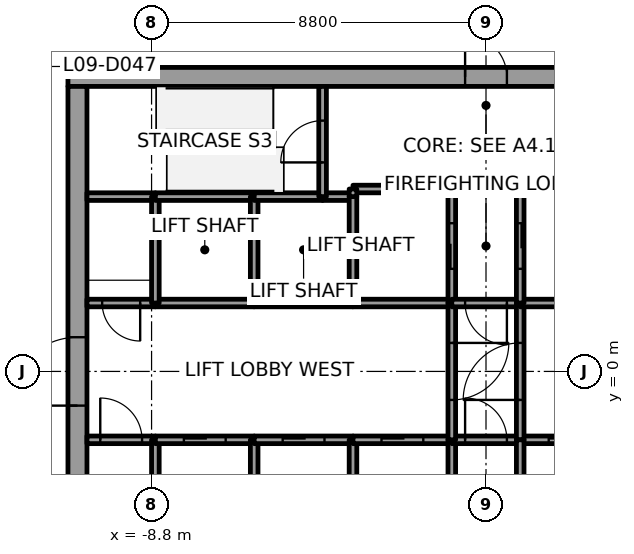
"""IFC4 building model, lengths in metres.
Left out: names, types, materials, properties, quantities, classifications, styles, units other than length and angle.
Written with IfcOpenShell. Run it as: python <this file> out.ifc"""

import sys

from ifc_helpers import new_model, si_unit, direction, frame, frame_2d, origin, place, context, subcontext, project, spatial, rectangle, extrude, element, fill, save


model = new_model("IFC4")
c1 = context("Model", 3, precision=1e-05, world=origin(), true_north=direction((0.0, 1.0)))
c2 = subcontext(c1, "Body", "Model", "MODEL_VIEW")
j1 = project(units=[si_unit("LENGTHUNIT", "METRE"), si_unit("PLANEANGLEUNIT", "RADIAN")], contexts=[c1])
p1 = place(None, origin())
s1 = spatial("IfcSite", under=j1, at=p1, CompositionType="ELEMENT")
p2 = place(p1, origin())
s2 = spatial("IfcBuilding", under=s1, at=p2, CompositionType="ELEMENT")
p3 = place(p2, frame((0.0, 0.0, 55.4)))
s3 = spatial("IfcBuildingStorey", under=s2, at=p3, CompositionType="ELEMENT", Elevation=55.4)
p4 = place(p3, frame((-11.0, 7.75, 0.0), z_axis=(0.0, 0.0, 1.0), x_axis=(1.0, 0.0, 0.0)))
e1 = element("IfcWall", 1, at=p4, inside=s3, PredefinedType="SHEAR", context=c2, shape_type="SweptSolid", body=[
    extrude(rectangle(XDim=22.0, YDim=0.5, at=frame_2d((11.0, 0.0))), origin(), (0.0, 0.0, 1.0), 3.7),
])
p5 = place(p4, frame((10.45, 0.0, 0.0)))
e2 = element("IfcOpeningElement", 2, at=p5, cuts=e1, PredefinedType="OPENING", context=c2, shape_type="SweptSolid", body=[
    extrude(rectangle(XDim=1.1, YDim=2.1, at=frame_2d((0.55, 1.05))), frame((0.0, 0.25, 0.0), z_axis=(0.0, -1.0, 0.0), x_axis=(1.0, 0.0, 0.0)), (0.0, 0.0, 1.0), 0.5),
])
p6 = place(p3, frame((-10.75, -7.5, 0.0), z_axis=(0.0, 0.0, 1.0), x_axis=(0.0, 1.0, 0.0)))
e3 = element("IfcWall", 3, at=p6, inside=s3, PredefinedType="SHEAR", context=c2, shape_type="SweptSolid", body=[
    extrude(rectangle(XDim=15.0, YDim=0.5, at=frame_2d((7.5, 0.0))), origin(), (0.0, 0.0, 1.0), 3.7),
])
p7 = place(p6, frame((6.6, 0.0, 0.0)))
e4 = element("IfcOpeningElement", 4, at=p7, cuts=e3, PredefinedType="OPENING", context=c2, shape_type="SweptSolid", body=[
    extrude(rectangle(XDim=1.8, YDim=2.1, at=frame_2d((0.9, 1.05))), frame((0.0, 0.25, 0.0), z_axis=(0.0, -1.0, 0.0), x_axis=(1.0, 0.0, 0.0)), (0.0, 0.0, 1.0), 0.5),
])
p8 = place(p3, frame((-10.5, -1.8, 0.0), z_axis=(0.0, 0.0, 1.0), x_axis=(1.0, 0.0, 0.0)))
e5 = element("IfcWall", 5, at=p8, inside=s3, PredefinedType="SOLIDWALL", context=c2, shape_type="SweptSolid", body=[
    extrude(rectangle(XDim=1.8, YDim=0.2, at=frame_2d((0.9, 0.0))), origin(), (0.0, 0.0, 1.0), 3.55),
])
p9 = place(p8, frame((0.35, 0.0, 0.0)))
e6 = element("IfcOpeningElement", 6, at=p9, cuts=e5, PredefinedType="OPENING", context=c2, shape_type="SweptSolid", body=[
    extrude(rectangle(XDim=1.1, YDim=2.1, at=frame_2d((0.55, 1.05))), frame((0.0, 0.1, 0.0), z_axis=(0.0, -1.0, 0.0), x_axis=(1.0, 0.0, 0.0)), (0.0, 0.0, 1.0), 0.2),
])
p10 = place(p3, frame((-8.7, 1.8, 0.0), z_axis=(0.0, 0.0, 1.0), x_axis=(-1.0, 0.0, 0.0)))
e7 = element("IfcWall", 7, at=p10, inside=s3, PredefinedType="SOLIDWALL", context=c2, shape_type="SweptSolid", body=[
    extrude(rectangle(XDim=1.8, YDim=0.2, at=frame_2d((0.9, 0.0))), origin(), (0.0, 0.0, 1.0), 3.55),
])
p11 = place(p10, frame((0.4, 0.0, 0.0)))
e8 = element("IfcOpeningElement", 8, at=p11, cuts=e7, PredefinedType="OPENING", context=c2, shape_type="SweptSolid", body=[
    extrude(rectangle(XDim=1.0, YDim=2.1, at=frame_2d((0.5, 1.05))), frame((0.0, 0.1, 0.0), z_axis=(0.0, -1.0, 0.0), x_axis=(1.0, 0.0, 0.0)), (0.0, 0.0, 1.0), 0.2),
])
p12 = place(p3, frame((-8.7, 4.6, 0.0), z_axis=(0.0, 0.0, 1.0), x_axis=(-1.0, 0.0, 0.0)))
e9 = element("IfcWall", 9, at=p12, inside=s3, PredefinedType="SOLIDWALL", context=c2, shape_type="SweptSolid", body=[
    extrude(rectangle(XDim=1.8, YDim=0.2, at=frame_2d((0.9, 0.0))), origin(), (0.0, 0.0, 1.0), 3.55),
])
p13 = place(p3, frame((-8.7, -4.6, 0.0), z_axis=(0.0, 0.0, 1.0), x_axis=(0.0, 1.0, 0.0)))
e10 = element("IfcWall", 10, at=p13, inside=s3, PredefinedType="SOLIDWALL", context=c2, shape_type="SweptSolid", body=[
    extrude(rectangle(XDim=2.8, YDim=0.2, at=frame_2d((1.4, 0.0))), origin(), (0.0, 0.0, 1.0), 3.55),
])
p14 = place(p3, frame((-8.7, -1.8, 0.0), z_axis=(0.0, 0.0, 1.0), x_axis=(1.0, 0.0, 0.0)))
e11 = element("IfcWall", 11, at=p14, inside=s3, PredefinedType="SOLIDWALL", context=c2, shape_type="SweptSolid", body=[
    extrude(rectangle(XDim=2.6, YDim=0.2, at=frame_2d((1.3, 0.0))), origin(), (0.0, 0.0, 1.0), 3.55),
])
p15 = place(p14, frame((0.75, 0.0, 0.0)))
e12 = element("IfcOpeningElement", 12, at=p15, cuts=e11, PredefinedType="OPENING", context=c2, shape_type="SweptSolid", body=[
    extrude(rectangle(XDim=1.1, YDim=2.1, at=frame_2d((0.55, 1.05))), frame((0.0, 0.1, 0.0), z_axis=(0.0, -1.0, 0.0), x_axis=(1.0, 0.0, 0.0)), (0.0, 0.0, 1.0), 0.2),
])
p16 = place(p3, frame((-6.1, 1.8, 0.0), z_axis=(0.0, 0.0, 1.0), x_axis=(-1.0, 0.0, 0.0)))
e13 = element("IfcWall", 13, at=p16, inside=s3, PredefinedType="SOLIDWALL", context=c2, shape_type="SweptSolid", body=[
    extrude(rectangle(XDim=2.6, YDim=0.2, at=frame_2d((1.3, 0.0))), origin(), (0.0, 0.0, 1.0), 3.55),
])
p17 = place(p3, frame((-8.7, 1.8, 0.0), z_axis=(0.0, 0.0, 1.0), x_axis=(0.0, 1.0, 0.0)))
e14 = element("IfcWall", 14, at=p17, inside=s3, PredefinedType="SOLIDWALL", context=c2, shape_type="SweptSolid", body=[
    extrude(rectangle(XDim=2.8, YDim=0.2, at=frame_2d((1.4, 0.0))), origin(), (0.0, 0.0, 1.0), 3.55),
])
p18 = place(p3, frame((-6.1, 4.6, 0.0), z_axis=(0.0, 0.0, 1.0), x_axis=(-1.0, 0.0, 0.0)))
e15 = element("IfcWall", 15, at=p18, inside=s3, PredefinedType="SOLIDWALL", context=c2, shape_type="SweptSolid", body=[
    extrude(rectangle(XDim=2.6, YDim=0.2, at=frame_2d((1.3, 0.0))), origin(), (0.0, 0.0, 1.0), 3.55),
])
p19 = place(p3, frame((-6.1, -4.6, 0.0), z_axis=(0.0, 0.0, 1.0), x_axis=(0.0, 1.0, 0.0)))
e16 = element("IfcWall", 16, at=p19, inside=s3, PredefinedType="SOLIDWALL", context=c2, shape_type="SweptSolid", body=[
    extrude(rectangle(XDim=2.8, YDim=0.2, at=frame_2d((1.4, 0.0))), origin(), (0.0, 0.0, 1.0), 3.55),
])
p20 = place(p3, frame((-6.1, -1.8, 0.0), z_axis=(0.0, 0.0, 1.0), x_axis=(1.0, 0.0, 0.0)))
e17 = element("IfcWall", 17, at=p20, inside=s3, PredefinedType="SOLIDWALL", context=c2, shape_type="SweptSolid", body=[
    extrude(rectangle(XDim=2.6, YDim=0.2, at=frame_2d((1.3, 0.0))), origin(), (0.0, 0.0, 1.0), 3.55),
])
p21 = place(p20, frame((0.75, 0.0, 0.0)))
e18 = element("IfcOpeningElement", 18, at=p21, cuts=e17, PredefinedType="OPENING", context=c2, shape_type="SweptSolid", body=[
    extrude(rectangle(XDim=1.1, YDim=2.1, at=frame_2d((0.55, 1.05))), frame((0.0, 0.1, 0.0), z_axis=(0.0, -1.0, 0.0), x_axis=(1.0, 0.0, 0.0)), (0.0, 0.0, 1.0), 0.2),
])
p22 = place(p3, frame((-3.5, 1.8, 0.0), z_axis=(0.0, 0.0, 1.0), x_axis=(-1.0, 0.0, 0.0)))
e19 = element("IfcWall", 19, at=p22, inside=s3, PredefinedType="SOLIDWALL", context=c2, shape_type="SweptSolid", body=[
    extrude(rectangle(XDim=2.6, YDim=0.2, at=frame_2d((1.3, 0.0))), origin(), (0.0, 0.0, 1.0), 3.55),
])
p23 = place(p3, frame((-6.1, 1.8, 0.0), z_axis=(0.0, 0.0, 1.0), x_axis=(0.0, 1.0, 0.0)))
e20 = element("IfcWall", 20, at=p23, inside=s3, PredefinedType="SOLIDWALL", context=c2, shape_type="SweptSolid", body=[
    extrude(rectangle(XDim=2.8, YDim=0.2, at=frame_2d((1.4, 0.0))), origin(), (0.0, 0.0, 1.0), 3.55),
])
p24 = place(p3, frame((-4.3, 4.6, 0.0), z_axis=(0.0, 0.0, 1.0), x_axis=(-1.0, 0.0, 0.0)))
e21 = element("IfcWall", 21, at=p24, inside=s3, PredefinedType="SOLIDWALL", context=c2, shape_type="SweptSolid", body=[
    extrude(rectangle(XDim=1.8, YDim=0.2, at=frame_2d((0.9, 0.0))), origin(), (0.0, 0.0, 1.0), 3.55),
])
p25 = place(p3, frame((-3.5, 4.6, 0.0), z_axis=(0.0, 0.0, 1.0), x_axis=(-1.0, 0.0, 0.0)))
e22 = element("IfcWall", 22, at=p25, inside=s3, PredefinedType="SOLIDWALL", context=c2, shape_type="SweptSolid", body=[
    extrude(rectangle(XDim=0.8, YDim=0.2, at=frame_2d((0.4, 0.0))), origin(), (0.0, 0.0, 1.0), 3.55),
])
p26 = place(p3, frame((-4.3, 4.6, 0.0), z_axis=(0.0, 0.0, 1.0), x_axis=(0.0, 1.0, 0.0)))
e23 = element("IfcWall", 23, at=p26, inside=s3, PredefinedType="SOLIDWALL", context=c2, shape_type="SweptSolid", body=[
    extrude(rectangle(XDim=2.9, YDim=0.2, at=frame_2d((1.45, 0.0))), origin(), (0.0, 0.0, 1.0), 3.55),
])
p27 = place(p26, frame((0.9, 0.0, 0.0)))
e24 = element("IfcOpeningElement", 24, at=p27, cuts=e23, PredefinedType="OPENING", context=c2, shape_type="SweptSolid", body=[
    extrude(rectangle(XDim=1.1, YDim=2.1, at=frame_2d((0.55, 1.05))), frame((0.0, 0.1, 0.0), z_axis=(0.0, -1.0, 0.0), x_axis=(1.0, 0.0, 0.0)), (0.0, 0.0, 1.0), 0.2),
])
p28 = place(p3, frame((-3.5, -4.6, 0.0), z_axis=(0.0, 0.0, 1.0), x_axis=(0.0, 1.0, 0.0)))
e25 = element("IfcWall", 25, at=p28, inside=s3, PredefinedType="SOLIDWALL", context=c2, shape_type="SweptSolid", body=[
    extrude(rectangle(XDim=2.8, YDim=0.2, at=frame_2d((1.4, 0.0))), origin(), (0.0, 0.0, 1.0), 3.55),
])
p29 = place(p3, frame((-3.5, -1.8, 0.0), z_axis=(0.0, 0.0, 1.0), x_axis=(1.0, 0.0, 0.0)))
e26 = element("IfcWall", 26, at=p29, inside=s3, PredefinedType="SOLIDWALL", context=c2, shape_type="SweptSolid", body=[
    extrude(rectangle(XDim=2.6, YDim=0.2, at=frame_2d((1.3, 0.0))), origin(), (0.0, 0.0, 1.0), 3.55),
])
p30 = place(p29, frame((0.75, 0.0, 0.0)))
e27 = element("IfcOpeningElement", 27, at=p30, cuts=e26, PredefinedType="OPENING", context=c2, shape_type="SweptSolid", body=[
    extrude(rectangle(XDim=1.1, YDim=2.1, at=frame_2d((0.55, 1.05))), frame((0.0, 0.1, 0.0), z_axis=(0.0, -1.0, 0.0), x_axis=(1.0, 0.0, 0.0)), (0.0, 0.0, 1.0), 0.2),
])
p31 = place(p3, frame((-0.9, 1.8, 0.0), z_axis=(0.0, 0.0, 1.0), x_axis=(-1.0, 0.0, 0.0)))
e28 = element("IfcWall", 28, at=p31, inside=s3, PredefinedType="SOLIDWALL", context=c2, shape_type="SweptSolid", body=[
    extrude(rectangle(XDim=2.6, YDim=0.2, at=frame_2d((1.3, 0.0))), origin(), (0.0, 0.0, 1.0), 3.55),
])
p32 = place(p3, frame((-3.5, 4.6, 0.0), z_axis=(0.0, 0.0, 1.0), x_axis=(0.0, -1.0, 0.0)))
e29 = element("IfcWall", 29, at=p32, inside=s3, PredefinedType="SOLIDWALL", context=c2, shape_type="SweptSolid", body=[
    extrude(rectangle(XDim=2.8, YDim=0.2, at=frame_2d((1.4, 0.0))), origin(), (0.0, 0.0, 1.0), 3.55),
])
p33 = place(p3, frame((-0.9, 1.8, 0.0), z_axis=(0.0, 0.0, 1.0), x_axis=(0.0, 1.0, 0.0)))
e30 = element("IfcWall", 30, at=p33, inside=s3, PredefinedType="SOLIDWALL", context=c2, shape_type="SweptSolid", body=[
    extrude(rectangle(XDim=3.0, YDim=0.2, at=frame_2d((1.5, 0.0))), origin(), (0.0, 0.0, 1.0), 3.55),
])
p34 = place(p33, frame((0.9, 0.0, 0.0)))
e31 = element("IfcOpeningElement", 31, at=p34, cuts=e30, PredefinedType="OPENING", context=c2, shape_type="SweptSolid", body=[
    extrude(rectangle(XDim=1.2, YDim=2.1, at=frame_2d((0.6, 1.05))), frame((0.0, 0.1, 0.0), z_axis=(0.0, -1.0, 0.0), x_axis=(1.0, 0.0, 0.0)), (0.0, 0.0, 1.0), 0.2),
])
p35 = place(p3, frame((-0.9, 4.8, 0.0), z_axis=(0.0, 0.0, 1.0), x_axis=(-1.0, 0.0, 0.0)))
e32 = element("IfcWall", 32, at=p35, inside=s3, PredefinedType="SOLIDWALL", context=c2, shape_type="SweptSolid", body=[
    extrude(rectangle(XDim=2.6, YDim=0.2, at=frame_2d((1.3, 0.0))), origin(), (0.0, 0.0, 1.0), 3.55),
])
p36 = place(p3, frame((-3.5, 4.8, 0.0), z_axis=(0.0, 0.0, 1.0), x_axis=(0.0, -1.0, 0.0)))
e33 = element("IfcWall", 33, at=p36, inside=s3, PredefinedType="SOLIDWALL", context=c2, shape_type="SweptSolid", body=[
    extrude(rectangle(XDim=0.2, YDim=0.2, at=frame_2d((0.1, 0.0))), origin(), (0.0, 0.0, 1.0), 3.55),
])
p37 = place(p3, frame((-0.9, -4.6, 0.0), z_axis=(0.0, 0.0, 1.0), x_axis=(0.0, 1.0, 0.0)))
e34 = element("IfcWall", 34, at=p37, inside=s3, PredefinedType="SOLIDWALL", context=c2, shape_type="SweptSolid", body=[
    extrude(rectangle(XDim=2.8, YDim=0.2, at=frame_2d((1.4, 0.0))), origin(), (0.0, 0.0, 1.0), 3.55),
])
p38 = place(p3, frame((-0.9, -1.8, 0.0), z_axis=(0.0, 0.0, 1.0), x_axis=(1.0, 0.0, 0.0)))
e35 = element("IfcWall", 35, at=p38, inside=s3, PredefinedType="SOLIDWALL", context=c2, shape_type="SweptSolid", body=[
    extrude(rectangle(XDim=1.8, YDim=0.2, at=frame_2d((0.9, 0.0))), origin(), (0.0, 0.0, 1.0), 3.55),
])
p39 = place(p38, frame((0.35, 0.0, 0.0)))
e36 = element("IfcOpeningElement", 36, at=p39, cuts=e35, PredefinedType="OPENING", context=c2, shape_type="SweptSolid", body=[
    extrude(rectangle(XDim=1.1, YDim=2.1, at=frame_2d((0.55, 1.05))), frame((0.0, 0.1, 0.0), z_axis=(0.0, -1.0, 0.0), x_axis=(1.0, 0.0, 0.0)), (0.0, 0.0, 1.0), 0.2),
])
p40 = place(p3, frame((-0.9, 1.8, 0.0), z_axis=(0.0, 0.0, 1.0), x_axis=(0.0, -1.0, 0.0)))
e37 = element("IfcWall", 37, at=p40, inside=s3, PredefinedType="SOLIDWALL", context=c2, shape_type="SweptSolid", body=[
    extrude(rectangle(XDim=3.6, YDim=0.2, at=frame_2d((1.8, 0.0))), origin(), (0.0, 0.0, 1.0), 3.55),
])
p41 = place(p40, frame((1.05, 0.0, 0.0)))
e38 = element("IfcOpeningElement", 38, at=p41, cuts=e37, PredefinedType="OPENING", context=c2, shape_type="SweptSolid", body=[
    extrude(rectangle(XDim=1.5, YDim=2.1, at=frame_2d((0.75, 1.05))), frame((0.0, 0.1, 0.0), z_axis=(0.0, -1.0, 0.0), x_axis=(1.0, 0.0, 0.0)), (0.0, 0.0, 1.0), 0.2),
])
p42 = place(p3, frame((0.9, 1.8, 0.0), z_axis=(0.0, 0.0, 1.0), x_axis=(-1.0, 0.0, 0.0)))
e39 = element("IfcWall", 39, at=p42, inside=s3, PredefinedType="SOLIDWALL", context=c2, shape_type="SweptSolid", body=[
    extrude(rectangle(XDim=1.8, YDim=0.2, at=frame_2d((0.9, 0.0))), origin(), (0.0, 0.0, 1.0), 3.55),
])
p43 = place(p42, frame((0.35, 0.0, 0.0)))
e40 = element("IfcOpeningElement", 40, at=p43, cuts=e39, PredefinedType="OPENING", context=c2, shape_type="SweptSolid", body=[
    extrude(rectangle(XDim=1.1, YDim=2.1, at=frame_2d((0.55, 1.05))), frame((0.0, 0.1, 0.0), z_axis=(0.0, -1.0, 0.0), x_axis=(1.0, 0.0, 0.0)), (0.0, 0.0, 1.0), 0.2),
])
p44 = place(p3, frame((0.9, -1.8, 0.0), z_axis=(0.0, 0.0, 1.0), x_axis=(1.0, 0.0, 0.0)))
e41 = element("IfcWall", 41, at=p44, inside=s3, PredefinedType="SOLIDWALL", context=c2, shape_type="SweptSolid", body=[
    extrude(rectangle(XDim=2.6, YDim=0.2, at=frame_2d((1.3, 0.0))), origin(), (0.0, 0.0, 1.0), 3.55),
])
p45 = place(p44, frame((0.75, 0.0, 0.0)))
e42 = element("IfcOpeningElement", 42, at=p45, cuts=e41, PredefinedType="OPENING", context=c2, shape_type="SweptSolid", body=[
    extrude(rectangle(XDim=1.1, YDim=2.1, at=frame_2d((0.55, 1.05))), frame((0.0, 0.1, 0.0), z_axis=(0.0, -1.0, 0.0), x_axis=(1.0, 0.0, 0.0)), (0.0, 0.0, 1.0), 0.2),
])
p46 = place(p3, frame((0.9, -1.8, 0.0), z_axis=(0.0, 0.0, 1.0), x_axis=(0.0, 1.0, 0.0)))
e43 = element("IfcWall", 43, at=p46, inside=s3, PredefinedType="SOLIDWALL", context=c2, shape_type="SweptSolid", body=[
    extrude(rectangle(XDim=3.6, YDim=0.2, at=frame_2d((1.8, 0.0))), origin(), (0.0, 0.0, 1.0), 3.55),
])
p47 = place(p46, frame((1.05, 0.0, 0.0)))
e44 = element("IfcOpeningElement", 44, at=p47, cuts=e43, PredefinedType="OPENING", context=c2, shape_type="SweptSolid", body=[
    extrude(rectangle(XDim=1.5, YDim=2.1, at=frame_2d((0.75, 1.05))), frame((0.0, 0.1, 0.0), z_axis=(0.0, -1.0, 0.0), x_axis=(1.0, 0.0, 0.0)), (0.0, 0.0, 1.0), 0.2),
])
p48 = place(p3, frame((0.9, -1.8, 0.0), z_axis=(0.0, 0.0, 1.0), x_axis=(0.0, -1.0, 0.0)))
e45 = element("IfcWall", 45, at=p48, inside=s3, PredefinedType="SOLIDWALL", context=c2, shape_type="SweptSolid", body=[
    extrude(rectangle(XDim=2.8, YDim=0.2, at=frame_2d((1.4, 0.0))), origin(), (0.0, 0.0, 1.0), 3.55),
])
for number, where, z_axis, x_axis in (
    (46, (3.5, 1.8, 0.0), (0.0, 0.0, 1.0), (-1.0, 0.0, 0.0)),
    (47, (3.5, 4.8, 0.0), (0.0, 0.0, 1.0), (-1.0, 0.0, 0.0)),
):
    element("IfcWall", number, at=place(p3, frame(where, z_axis=z_axis, x_axis=x_axis)), inside=s3, PredefinedType="SOLIDWALL", context=c2, shape_type="SweptSolid", body=[
        extrude(rectangle(XDim=2.6, YDim=0.2, at=frame_2d((1.3, 0.0))), origin(), (0.0, 0.0, 1.0), 3.55),
    ])
p49 = place(p3, frame((0.9, 4.8, 0.0), z_axis=(0.0, 0.0, 1.0), x_axis=(0.0, -1.0, 0.0)))
e48 = element("IfcWall", 48, at=p49, inside=s3, PredefinedType="SOLIDWALL", context=c2, shape_type="SweptSolid", body=[
    extrude(rectangle(XDim=3.0, YDim=0.2, at=frame_2d((1.5, 0.0))), origin(), (0.0, 0.0, 1.0), 3.55),
])
p50 = place(p49, frame((0.9, 0.0, 0.0)))
e49 = element("IfcOpeningElement", 49, at=p50, cuts=e48, PredefinedType="OPENING", context=c2, shape_type="SweptSolid", body=[
    extrude(rectangle(XDim=1.2, YDim=2.1, at=frame_2d((0.6, 1.05))), frame((0.0, 0.1, 0.0), z_axis=(0.0, -1.0, 0.0), x_axis=(1.0, 0.0, 0.0)), (0.0, 0.0, 1.0), 0.2),
])
p51 = place(p15, origin())
e50 = element("IfcDoor", 50, at=p51, inside=s3, OperationType="SLIDING_TO_LEFT", PredefinedType="DOOR", context=c2, shape_type="SweptSolid", body=[
    extrude(rectangle(XDim=1.1, YDim=2.1, at=frame_2d((0.55, 1.05))), frame((0.0, 0.025, 0.0), z_axis=(0.0, -1.0, 0.0), x_axis=(1.0, 0.0, 0.0)), (0.0, 0.0, 1.0), 0.05),
])
fill(e12, e50)
p52 = place(p21, origin())
e51 = element("IfcDoor", 51, at=p52, inside=s3, OperationType="SLIDING_TO_RIGHT", PredefinedType="DOOR", context=c2, shape_type="SweptSolid", body=[
    extrude(rectangle(XDim=1.1, YDim=2.1, at=frame_2d((0.55, 1.05))), frame((0.0, 0.025, 0.0), z_axis=(0.0, -1.0, 0.0), x_axis=(1.0, 0.0, 0.0)), (0.0, 0.0, 1.0), 0.05),
])
fill(e18, e51)
p53 = place(p30, origin())
e52 = element("IfcDoor", 52, at=p53, inside=s3, OperationType="SLIDING_TO_RIGHT", PredefinedType="DOOR", context=c2, shape_type="SweptSolid", body=[
    extrude(rectangle(XDim=1.1, YDim=2.1, at=frame_2d((0.55, 1.05))), frame((0.0, 0.025, 0.0), z_axis=(0.0, -1.0, 0.0), x_axis=(1.0, 0.0, 0.0)), (0.0, 0.0, 1.0), 0.05),
])
fill(e27, e52)
p54 = place(p45, origin())
e53 = element("IfcDoor", 53, at=p54, inside=s3, OperationType="SLIDING_TO_RIGHT", PredefinedType="DOOR", context=c2, shape_type="SweptSolid", body=[
    extrude(rectangle(XDim=1.1, YDim=2.1, at=frame_2d((0.55, 1.05))), frame((0.0, 0.025, 0.0), z_axis=(0.0, -1.0, 0.0), x_axis=(1.0, 0.0, 0.0)), (0.0, 0.0, 1.0), 0.05),
])
fill(e42, e53)
p55 = place(p34, origin())
e54 = element("IfcDoor", 54, at=p55, inside=s3, OperationType="SLIDING_TO_RIGHT", PredefinedType="DOOR", context=c2, shape_type="SweptSolid", body=[
    extrude(rectangle(XDim=1.2, YDim=2.1, at=frame_2d((0.6, 1.05))), frame((0.0, 0.025, 0.0), z_axis=(0.0, -1.0, 0.0), x_axis=(1.0, 0.0, 0.0)), (0.0, 0.0, 1.0), 0.05),
])
fill(e31, e54)
p56 = place(p50, origin())
e55 = element("IfcDoor", 55, at=p56, inside=s3, OperationType="SLIDING_TO_RIGHT", PredefinedType="DOOR", context=c2, shape_type="SweptSolid", body=[
    extrude(rectangle(XDim=1.2, YDim=2.1, at=frame_2d((0.6, 1.05))), frame((0.0, 0.025, 0.0), z_axis=(0.0, -1.0, 0.0), x_axis=(1.0, 0.0, 0.0)), (0.0, 0.0, 1.0), 0.05),
])
fill(e49, e55)
p57 = place(p41, origin())
e56 = element("IfcDoor", 56, at=p57, inside=s3, OperationType="DOUBLE_DOOR_SINGLE_SWING", PredefinedType="DOOR", context=c2, shape_type="SweptSolid", body=[
    extrude(rectangle(XDim=1.5, YDim=2.1, at=frame_2d((0.75, 1.05))), frame((0.0, 0.025, 0.0), z_axis=(0.0, -1.0, 0.0), x_axis=(1.0, 0.0, 0.0)), (0.0, 0.0, 1.0), 0.05),
])
fill(e38, e56)
p58 = place(p47, origin())
e57 = element("IfcDoor", 57, at=p58, inside=s3, OperationType="DOUBLE_DOOR_SINGLE_SWING", PredefinedType="DOOR", context=c2, shape_type="SweptSolid", body=[
    extrude(rectangle(XDim=1.5, YDim=2.1, at=frame_2d((0.75, 1.05))), frame((0.0, 0.025, 0.0), z_axis=(0.0, -1.0, 0.0), x_axis=(1.0, 0.0, 0.0)), (0.0, 0.0, 1.0), 0.05),
])
fill(e44, e57)
p59 = place(p9, origin())
e58 = element("IfcDoor", 58, at=p59, inside=s3, OperationType="SINGLE_SWING_RIGHT", PredefinedType="DOOR", context=c2, shape_type="SweptSolid", body=[
    extrude(rectangle(XDim=1.1, YDim=2.1, at=frame_2d((0.55, 1.05))), frame((0.0, 0.025, 0.0), z_axis=(0.0, -1.0, 0.0), x_axis=(1.0, 0.0, 0.0)), (0.0, 0.0, 1.0), 0.05),
])
fill(e6, e58)
p60 = place(p43, origin())
e59 = element("IfcDoor", 59, at=p60, inside=s3, OperationType="SINGLE_SWING_RIGHT", PredefinedType="DOOR", context=c2, shape_type="SweptSolid", body=[
    extrude(rectangle(XDim=1.1, YDim=2.1, at=frame_2d((0.55, 1.05))), frame((0.0, 0.025, 0.0), z_axis=(0.0, -1.0, 0.0), x_axis=(1.0, 0.0, 0.0)), (0.0, 0.0, 1.0), 0.05),
])
fill(e40, e59)
p61 = place(p39, origin())
e60 = element("IfcDoor", 60, at=p61, inside=s3, OperationType="SINGLE_SWING_RIGHT", PredefinedType="DOOR", context=c2, shape_type="SweptSolid", body=[
    extrude(rectangle(XDim=1.1, YDim=2.1, at=frame_2d((0.55, 1.05))), frame((0.0, 0.025, 0.0), z_axis=(0.0, -1.0, 0.0), x_axis=(1.0, 0.0, 0.0)), (0.0, 0.0, 1.0), 0.05),
])
fill(e36, e60)
p62 = place(p11, origin())
e61 = element("IfcDoor", 61, at=p62, inside=s3, OperationType="SINGLE_SWING_LEFT", PredefinedType="DOOR", context=c2, shape_type="SweptSolid", body=[
    extrude(rectangle(XDim=1.0, YDim=2.1, at=frame_2d((0.5, 1.05))), frame((0.0, 0.025, 0.0), z_axis=(0.0, -1.0, 0.0), x_axis=(1.0, 0.0, 0.0)), (0.0, 0.0, 1.0), 0.05),
])
fill(e8, e61)
p63 = place(p27, origin())
e62 = element("IfcDoor", 62, at=p63, inside=s3, OperationType="SINGLE_SWING_RIGHT", PredefinedType="DOOR", context=c2, shape_type="SweptSolid", body=[
    extrude(rectangle(XDim=1.1, YDim=2.1, at=frame_2d((0.55, 1.05))), frame((0.0, 0.025, 0.0), z_axis=(0.0, -1.0, 0.0), x_axis=(1.0, 0.0, 0.0)), (0.0, 0.0, 1.0), 0.05),
])
fill(e24, e62)
p64 = place(p7, origin())
e63 = element("IfcDoor", 63, at=p64, inside=s3, OperationType="DOUBLE_DOOR_SINGLE_SWING", PredefinedType="DOOR", context=c2, shape_type="SweptSolid", body=[
    extrude(rectangle(XDim=1.8, YDim=2.1, at=frame_2d((0.9, 1.05))), frame((0.0, 0.025, 0.0), z_axis=(0.0, -1.0, 0.0), x_axis=(1.0, 0.0, 0.0)), (0.0, 0.0, 1.0), 0.05),
])
fill(e4, e63)
p65 = place(p5, origin())
e64 = element("IfcDoor", 64, at=p65, inside=s3, OperationType="SINGLE_SWING_RIGHT", PredefinedType="DOOR", context=c2, shape_type="SweptSolid", body=[
    extrude(rectangle(XDim=1.1, YDim=2.1, at=frame_2d((0.55, 1.05))), frame((0.0, 0.025, 0.0), z_axis=(0.0, -1.0, 0.0), x_axis=(1.0, 0.0, 0.0)), (0.0, 0.0, 1.0), 0.05),
])
fill(e2, e64)
save(model, sys.argv[1])
